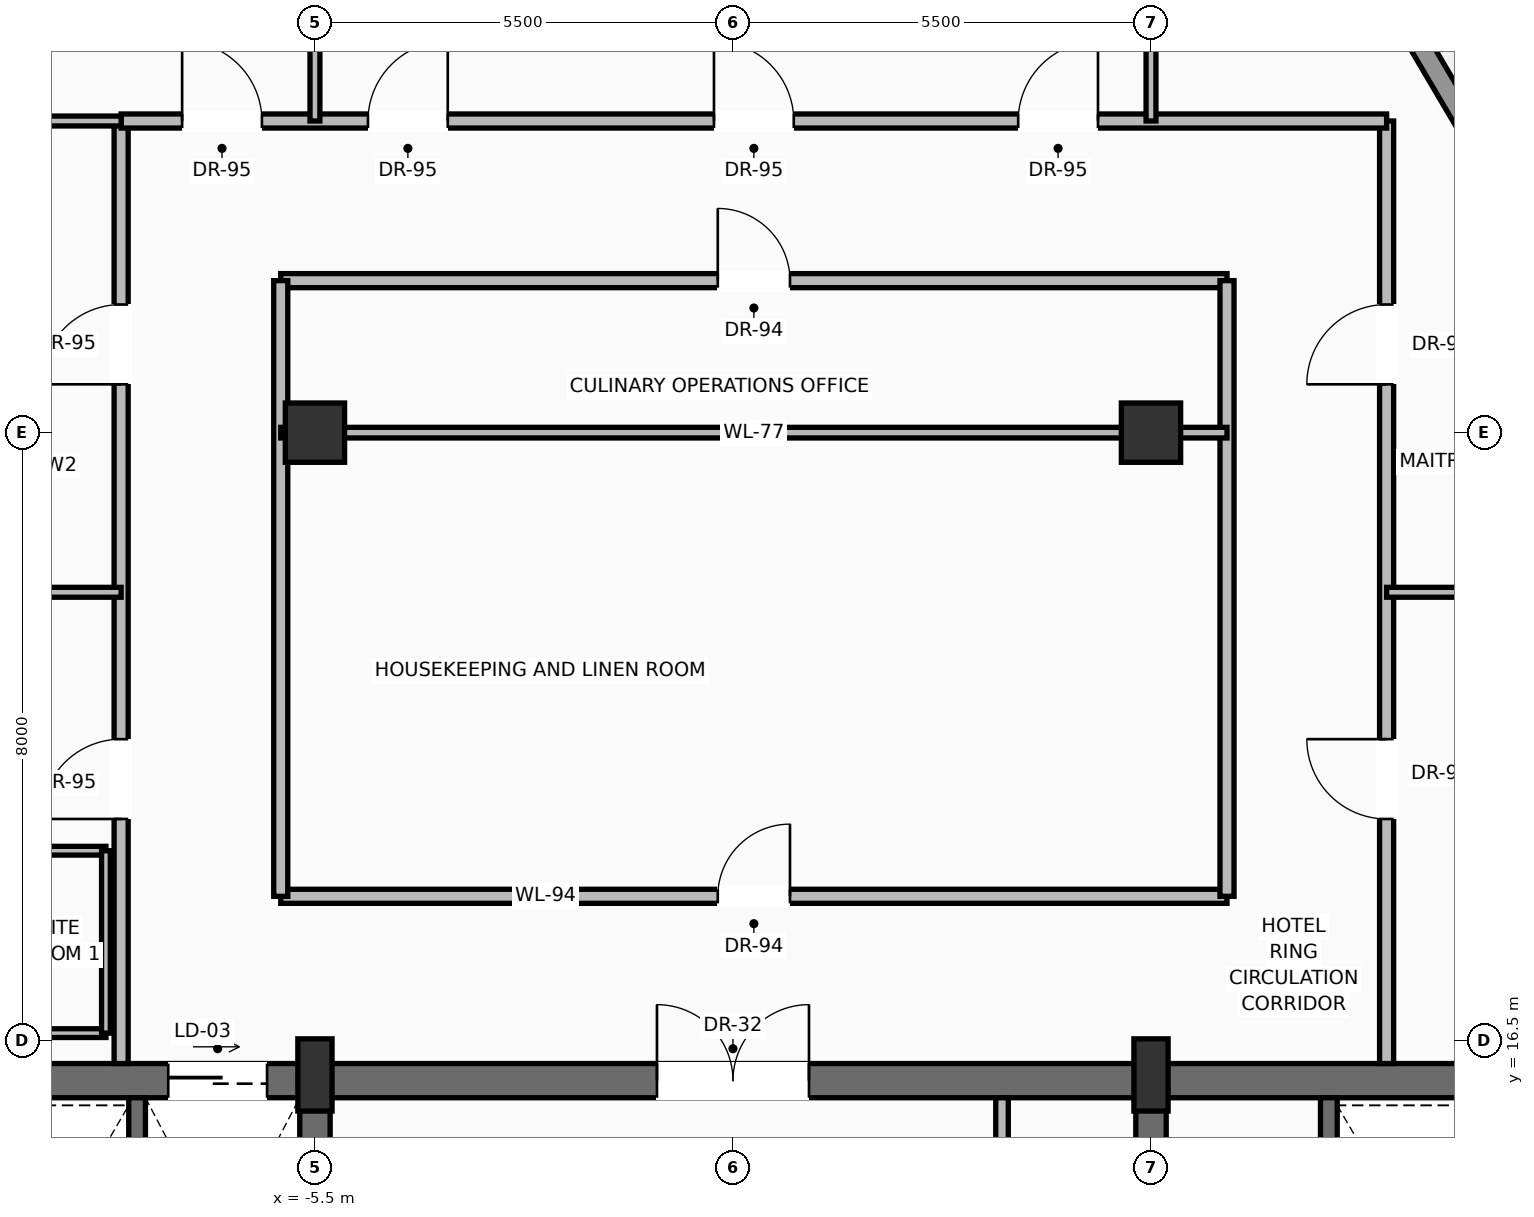
"""IFC4 building model, lengths in metres.
Left out: names, types, materials, properties, quantities, classifications, styles, units other than length and angle.
Written with IfcOpenShell. Run it as: python <this file> out.ifc"""

import sys

from ifc_helpers import new_model, si_unit, direction, frame, frame_2d, origin, origin_2d, place, context, subcontext, project, spatial, rectangle, extrude, source, transform, mapped, element, fill, save


model = new_model("IFC4")
c1 = context("Model", 3, precision=1e-05, world=origin(), true_north=direction((0.0, 1.0)))
c2 = subcontext(c1, "Body", "Model", "MODEL_VIEW")
j1 = project(units=[si_unit("LENGTHUNIT", "METRE"), si_unit("PLANEANGLEUNIT", "RADIAN")], contexts=[c1])
p1 = place(None, origin())
s1 = spatial("IfcSite", under=j1, at=p1, CompositionType="ELEMENT")
p2 = place(p1, origin())
s2 = spatial("IfcBuilding", under=s1, at=p2, CompositionType="ELEMENT")
p3 = place(p2, frame((0.0, 0.0, 279.9)))
s3 = spatial("IfcBuildingStorey", under=s2, at=p3, CompositionType="ELEMENT", Elevation=279.9)
p4 = place(p3, frame((-10.6, 15.975, 0.0), z_axis=(0.0, 0.0, 1.0), x_axis=(1.0, 0.0, 0.0)))
e1 = element("IfcWall", 1, at=p4, inside=s3, PredefinedType="SHEAR", context=c2, shape_type="SweptSolid", body=[
    extrude(rectangle(XDim=21.2, YDim=0.45, at=frame_2d((10.6, 0.0))), origin(), (0.0, 0.0, 1.0), 3.24),
])
p5 = place(p4, frame((3.17, 0.0, 0.0)))
e2 = element("IfcOpeningElement", 2, at=p5, cuts=e1, PredefinedType="OPENING", context=c2, shape_type="SweptSolid", body=[
    extrude(rectangle(XDim=1.3, YDim=2.3, at=frame_2d((0.65, 1.15))), frame((0.0, 0.235, 0.0), z_axis=(0.0, -1.0, 0.0), x_axis=(1.0, 0.0, 0.0)), (0.0, 0.0, 1.0), 0.47),
])
p6 = place(p4, frame((9.6, 0.0, 0.0)))
e3 = element("IfcOpeningElement", 3, at=p6, cuts=e1, PredefinedType="OPENING", context=c2, shape_type="SweptSolid", body=[
    extrude(rectangle(XDim=2.0, YDim=2.4, at=frame_2d((1.0, 1.2))), frame((0.0, 0.235, 0.0), z_axis=(0.0, -1.0, 0.0), x_axis=(1.0, 0.0, 0.0)), (0.0, 0.0, 1.0), 0.47),
])
p7 = place(p3, frame((-5.5, 0.625, 0.0), z_axis=(0.0, 0.0, 1.0), x_axis=(0.0, 1.0, 0.0)))
e4 = element("IfcWall", 4, at=p7, inside=s3, PredefinedType="SHEAR", context=c2, shape_type="SweptSolid", body=[
    extrude(rectangle(XDim=15.35, YDim=0.4, at=frame_2d((7.675, 0.0))), origin(), (0.0, 0.0, 1.0), 3.24),
])
p8 = place(p7, frame((8.875, 0.0, 0.0)))
e5 = element("IfcOpeningElement", 5, at=p8, cuts=e4, PredefinedType="OPENING", context=c2, shape_type="SweptSolid", body=[
    extrude(rectangle(XDim=1.1, YDim=2.2, at=frame_2d((0.55, 1.1))), frame((0.0, 0.21, 0.0), z_axis=(0.0, -1.0, 0.0), x_axis=(1.0, 0.0, 0.0)), (0.0, 0.0, 1.0), 0.42),
])
p9 = place(p3, frame((5.5, 0.625, 0.0), z_axis=(0.0, 0.0, 1.0), x_axis=(0.0, 1.0, 0.0)))
e6 = element("IfcWall", 6, at=p9, inside=s3, PredefinedType="SHEAR", context=c2, shape_type="SweptSolid", body=[
    extrude(rectangle(XDim=15.35, YDim=0.4, at=frame_2d((7.675, 0.0))), origin(), (0.0, 0.0, 1.0), 3.24),
])
p10 = place(p9, frame((8.875, 0.0, 0.0)))
e7 = element("IfcOpeningElement", 7, at=p10, cuts=e6, PredefinedType="OPENING", context=c2, shape_type="SweptSolid", body=[
    extrude(rectangle(XDim=1.1, YDim=2.2, at=frame_2d((0.55, 1.1))), frame((0.0, 0.21, 0.0), z_axis=(0.0, -1.0, 0.0), x_axis=(1.0, 0.0, 0.0)), (0.0, 0.0, 1.0), 0.42),
])
m1 = source(origin(), c2, "Body", "SweptSolid", [
    extrude(rectangle(XDim=0.45, YDim=0.95, at=origin_2d()), origin(), (0.0, 0.0, 1.0), 3.45),
])
for number, where, z_axis, x_axis in (
    (8, (-5.5, 16.05, 0.0), (0.0, 0.0, 1.0), (1.0, 0.0, 0.0)),
    (9, (5.5, 16.05, 0.0), (0.0, 0.0, 1.0), (1.0, 0.0, 0.0)),
):
    element("IfcColumn", number, at=place(p3, frame(where, z_axis=z_axis, x_axis=x_axis)), inside=s3, PredefinedType="PILASTER", context=c2, shape_type="MappedRepresentation", body=[
        mapped(m1, transform((0.0, 0.0, 0.0), scale=1.0)),
    ])
m2 = source(origin(), c2, "Body", "SweptSolid", [
    extrude(rectangle(XDim=0.78, YDim=0.78, at=origin_2d()), origin(), (0.0, 0.0, 1.0), 3.45),
])
for number, where, z_axis, x_axis in (
    (10, (-5.5, 24.5, 0.0), (0.0, 0.0, 1.0), (1.0, 0.0, 0.0)),
    (11, (5.5, 24.5, 0.0), (0.0, 0.0, 1.0), (1.0, 0.0, 0.0)),
):
    element("IfcColumn", number, at=place(p3, frame(where, z_axis=z_axis, x_axis=x_axis)), inside=s3, PredefinedType="COLUMN", context=c2, shape_type="MappedRepresentation", body=[
        mapped(m2, transform((0.0, 0.0, 0.0), scale=1.0)),
    ])
p11 = place(p3, frame((-18.34, 14.15, 0.0), z_axis=(0.0, 0.0, 1.0), x_axis=(0.499519590366, 0.866302590808, 0.0)))
e12 = element("IfcWall", 12, at=p11, inside=s3, PredefinedType="SOLIDWALL", context=c2, shape_type="SweptSolid", body=[
    extrude(rectangle(XDim=20.144, YDim=0.28, at=frame_2d((10.072, 0.0))), origin(), (0.0, 0.0, 1.0), 2.82),
])
p12 = place(p11, frame((4.834, 0.0, 0.0)))
e13 = element("IfcOpeningElement", 13, at=p12, cuts=e12, PredefinedType="OPENING", context=c2, shape_type="SweptSolid", body=[
    extrude(rectangle(XDim=1.6, YDim=2.35, at=frame_2d((0.8, 1.175))), frame((0.0, 0.15, 0.0), z_axis=(0.0, -1.0, 0.0), x_axis=(1.0, 0.0, 0.0)), (0.0, 0.0, 1.0), 0.3),
])
p13 = place(p11, frame((13.698, 0.0, 0.9)))
e14 = element("IfcOpeningElement", 14, at=p13, cuts=e12, PredefinedType="OPENING", context=c2, shape_type="SweptSolid", body=[
    extrude(rectangle(XDim=1.55, YDim=1.75, at=frame_2d((0.775, 0.875))), frame((0.0, 0.15, 0.0), z_axis=(0.0, -1.0, 0.0), x_axis=(1.0, 0.0, 0.0)), (0.0, 0.0, 1.0), 0.3),
])
p14 = place(p3, frame((7.796, 31.717, 0.0), z_axis=(0.0, 0.0, 1.0), x_axis=(0.507930566701, -0.861398014515, 0.0)))
e15 = element("IfcWall", 15, at=p14, inside=s3, PredefinedType="SOLIDWALL", context=c2, shape_type="SweptSolid", body=[
    extrude(rectangle(XDim=20.045, YDim=0.28, at=frame_2d((10.022, 0.0))), origin(), (0.0, 0.0, 1.0), 2.82),
])
p15 = place(p14, frame((4.811, 0.0, 0.0)))
e16 = element("IfcOpeningElement", 16, at=p15, cuts=e15, PredefinedType="OPENING", context=c2, shape_type="SweptSolid", body=[
    extrude(rectangle(XDim=1.6, YDim=2.35, at=frame_2d((0.8, 1.175))), frame((0.0, 0.15, 0.0), z_axis=(0.0, -1.0, 0.0), x_axis=(1.0, 0.0, 0.0)), (0.0, 0.0, 1.0), 0.3),
])
p16 = place(p14, frame((13.63, 0.0, 0.9)))
e17 = element("IfcOpeningElement", 17, at=p16, cuts=e15, PredefinedType="OPENING", context=c2, shape_type="SweptSolid", body=[
    extrude(rectangle(XDim=1.55, YDim=1.75, at=frame_2d((0.775, 0.875))), frame((0.0, 0.15, 0.0), z_axis=(0.0, -1.0, 0.0), x_axis=(1.0, 0.0, 0.0)), (0.0, 0.0, 1.0), 0.3),
])
for number, where, z_axis, x_axis in (
    (18, (-7.84, 11.87, 0.0), (0.0, 0.0, 1.0), (0.0, 1.0, 0.0)),
    (19, (7.84, 11.87, 0.0), (0.0, 0.0, 1.0), (0.0, 1.0, 0.0)),
):
    element("IfcWall", number, at=place(p3, frame(where, z_axis=z_axis, x_axis=x_axis)), inside=s3, PredefinedType="SOLIDWALL", context=c2, shape_type="SweptSolid", body=[
        extrude(rectangle(XDim=3.88, YDim=0.22, at=frame_2d((1.94, 0.0))), origin(), (0.0, 0.0, 1.0), 3.24),
    ])
p17 = place(p3, frame((3.54, 11.22, 0.0), z_axis=(0.0, 0.0, 1.0), x_axis=(0.0, 1.0, 0.0)))
e20 = element("IfcWall", 20, at=p17, inside=s3, PredefinedType="PARTITIONING", context=c2, shape_type="SweptSolid", body=[
    extrude(rectangle(XDim=4.53, YDim=0.165, at=frame_2d((2.265, 0.0))), origin(), (0.0, 0.0, 1.0), 3.232),
])
p18 = place(p17, frame((1.25, 0.0, 0.0)))
e21 = element("IfcOpeningElement", 21, at=p18, cuts=e20, PredefinedType="OPENING", context=c2, shape_type="SweptSolid", body=[
    extrude(rectangle(XDim=0.9, YDim=2.1, at=frame_2d((0.45, 1.05))), frame((0.0, 0.093, 0.0), z_axis=(0.0, -1.0, 0.0), x_axis=(1.0, 0.0, 0.0)), (0.0, 0.0, 1.0), 0.185),
])
p19 = place(p3, frame((-5.95, 18.4, 0.0), z_axis=(0.0, 0.0, 1.0), x_axis=(1.0, 0.0, 0.0)))
e22 = element("IfcWall", 22, at=p19, inside=s3, PredefinedType="PARTITIONING", context=c2, shape_type="SweptSolid", body=[
    extrude(rectangle(XDim=12.45, YDim=0.185, at=frame_2d((6.225, 0.0))), origin(), (0.0, 0.0, 1.0), 3.232),
])
p20 = place(p19, frame((5.75, 0.0, 0.0)))
e23 = element("IfcOpeningElement", 23, at=p20, cuts=e22, PredefinedType="OPENING", context=c2, shape_type="SweptSolid", body=[
    extrude(rectangle(XDim=0.95, YDim=2.2, at=frame_2d((0.475, 1.1))), frame((0.0, 0.103, 0.0), z_axis=(0.0, -1.0, 0.0), x_axis=(1.0, 0.0, 0.0)), (0.0, 0.0, 1.0), 0.205),
])
p21 = place(p3, frame((-5.95, 26.5, 0.0), z_axis=(0.0, 0.0, 1.0), x_axis=(1.0, 0.0, 0.0)))
e24 = element("IfcWall", 24, at=p21, inside=s3, PredefinedType="PARTITIONING", context=c2, shape_type="SweptSolid", body=[
    extrude(rectangle(XDim=12.45, YDim=0.185, at=frame_2d((6.225, 0.0))), origin(), (0.0, 0.0, 1.0), 3.232),
])
p22 = place(p21, frame((5.75, 0.0, 0.0)))
e25 = element("IfcOpeningElement", 25, at=p22, cuts=e24, PredefinedType="OPENING", context=c2, shape_type="SweptSolid", body=[
    extrude(rectangle(XDim=0.95, YDim=2.2, at=frame_2d((0.475, 1.1))), frame((0.0, 0.103, 0.0), z_axis=(0.0, -1.0, 0.0), x_axis=(1.0, 0.0, 0.0)), (0.0, 0.0, 1.0), 0.205),
])
for number, where, z_axis, x_axis in (
    (26, (-5.95, 18.4, 0.0), (0.0, 0.0, 1.0), (0.0, 1.0, 0.0)),
    (27, (6.5, 18.4, 0.0), (0.0, 0.0, 1.0), (0.0, 1.0, 0.0)),
):
    element("IfcWall", number, at=place(p3, frame(where, z_axis=z_axis, x_axis=x_axis)), inside=s3, PredefinedType="PARTITIONING", context=c2, shape_type="SweptSolid", body=[
        extrude(rectangle(XDim=8.1, YDim=0.185, at=frame_2d((4.05, 0.0))), origin(), (0.0, 0.0, 1.0), 3.232),
    ])
p23 = place(p3, frame((-8.05, 16.2, 0.0), z_axis=(0.0, 0.0, 1.0), x_axis=(0.0, 1.0, 0.0)))
e28 = element("IfcWall", 28, at=p23, inside=s3, PredefinedType="PARTITIONING", context=c2, shape_type="SweptSolid", body=[
    extrude(rectangle(XDim=12.4, YDim=0.185, at=frame_2d((6.2, 0.0))), origin(), (0.0, 0.0, 1.0), 3.232),
])
p24 = place(p23, frame((3.218, 0.0, 0.0)))
e29 = element("IfcOpeningElement", 29, at=p24, cuts=e28, PredefinedType="OPENING", context=c2, shape_type="SweptSolid", body=[
    extrude(rectangle(XDim=1.05, YDim=2.25, at=frame_2d((0.525, 1.125))), frame((0.0, 0.103, 0.0), z_axis=(0.0, -1.0, 0.0), x_axis=(1.0, 0.0, 0.0)), (0.0, 0.0, 1.0), 0.205),
])
p25 = place(p23, frame((8.936, 0.0, 0.0)))
e30 = element("IfcOpeningElement", 30, at=p25, cuts=e28, PredefinedType="OPENING", context=c2, shape_type="SweptSolid", body=[
    extrude(rectangle(XDim=1.05, YDim=2.25, at=frame_2d((0.525, 1.125))), frame((0.0, 0.103, 0.0), z_axis=(0.0, -1.0, 0.0), x_axis=(1.0, 0.0, 0.0)), (0.0, 0.0, 1.0), 0.205),
])
p26 = place(p3, frame((8.6, 16.2, 0.0), z_axis=(0.0, 0.0, 1.0), x_axis=(0.0, 1.0, 0.0)))
e31 = element("IfcWall", 31, at=p26, inside=s3, PredefinedType="PARTITIONING", context=c2, shape_type="SweptSolid", body=[
    extrude(rectangle(XDim=12.4, YDim=0.185, at=frame_2d((6.2, 0.0))), origin(), (0.0, 0.0, 1.0), 3.232),
])
p27 = place(p26, frame((3.218, 0.0, 0.0)))
e32 = element("IfcOpeningElement", 32, at=p27, cuts=e31, PredefinedType="OPENING", context=c2, shape_type="SweptSolid", body=[
    extrude(rectangle(XDim=1.05, YDim=2.25, at=frame_2d((0.525, 1.125))), frame((0.0, 0.103, 0.0), z_axis=(0.0, -1.0, 0.0), x_axis=(1.0, 0.0, 0.0)), (0.0, 0.0, 1.0), 0.205),
])
p28 = place(p26, frame((8.936, 0.0, 0.0)))
e33 = element("IfcOpeningElement", 33, at=p28, cuts=e31, PredefinedType="OPENING", context=c2, shape_type="SweptSolid", body=[
    extrude(rectangle(XDim=1.05, YDim=2.25, at=frame_2d((0.525, 1.125))), frame((0.0, 0.103, 0.0), z_axis=(0.0, -1.0, 0.0), x_axis=(1.0, 0.0, 0.0)), (0.0, 0.0, 1.0), 0.205),
])
p29 = place(p3, frame((-8.05, 28.6, 0.0), z_axis=(0.0, 0.0, 1.0), x_axis=(1.0, 0.0, 0.0)))
e34 = element("IfcWall", 34, at=p29, inside=s3, PredefinedType="PARTITIONING", context=c2, shape_type="SweptSolid", body=[
    extrude(rectangle(XDim=16.65, YDim=0.185, at=frame_2d((8.325, 0.0))), origin(), (0.0, 0.0, 1.0), 3.232),
])
p30 = place(p29, frame((3.248, 0.0, 0.0)))
e35 = element("IfcOpeningElement", 35, at=p30, cuts=e34, PredefinedType="OPENING", context=c2, shape_type="SweptSolid", body=[
    extrude(rectangle(XDim=1.05, YDim=2.25, at=frame_2d((0.525, 1.125))), frame((0.0, 0.103, 0.0), z_axis=(0.0, -1.0, 0.0), x_axis=(1.0, 0.0, 0.0)), (0.0, 0.0, 1.0), 0.205),
])
p31 = place(p29, frame((7.8, 0.0, 0.0)))
e36 = element("IfcOpeningElement", 36, at=p31, cuts=e34, PredefinedType="OPENING", context=c2, shape_type="SweptSolid", body=[
    extrude(rectangle(XDim=1.05, YDim=2.25, at=frame_2d((0.525, 1.125))), frame((0.0, 0.103, 0.0), z_axis=(0.0, -1.0, 0.0), x_axis=(1.0, 0.0, 0.0)), (0.0, 0.0, 1.0), 0.205),
])
p32 = place(p29, frame((11.802, 0.0, 0.0)))
e37 = element("IfcOpeningElement", 37, at=p32, cuts=e34, PredefinedType="OPENING", context=c2, shape_type="SweptSolid", body=[
    extrude(rectangle(XDim=1.05, YDim=2.25, at=frame_2d((0.525, 1.125))), frame((0.0, 0.103, 0.0), z_axis=(0.0, -1.0, 0.0), x_axis=(1.0, 0.0, 0.0)), (0.0, 0.0, 1.0), 0.205),
])
p33 = place(p29, frame((0.802, 0.0, 0.0)))
e38 = element("IfcOpeningElement", 38, at=p33, cuts=e34, PredefinedType="OPENING", context=c2, shape_type="SweptSolid", body=[
    extrude(rectangle(XDim=1.05, YDim=2.25, at=frame_2d((0.525, 1.125))), frame((0.0, 0.103, 0.0), z_axis=(0.0, -1.0, 0.0), x_axis=(1.0, 0.0, 0.0)), (0.0, 0.0, 1.0), 0.205),
])
p34 = place(p3, frame((-5.95, 24.5, 0.0), z_axis=(0.0, 0.0, 1.0), x_axis=(1.0, 0.0, 0.0)))
e39 = element("IfcWall", 39, at=p34, inside=s3, PredefinedType="PARTITIONING", context=c2, shape_type="SweptSolid", body=[
    extrude(rectangle(XDim=12.45, YDim=0.14, at=frame_2d((6.225, 0.0))), origin(), (0.0, 0.0, 1.0), 2.683),
])
p35 = place(p3, frame((-10.158, 28.6, 0.0), z_axis=(0.0, 0.0, 1.0), x_axis=(1.0, 0.0, 0.0)))
e40 = element("IfcWall", 40, at=p35, inside=s3, PredefinedType="PARTITIONING", context=c2, shape_type="SweptSolid", body=[
    extrude(rectangle(XDim=2.108, YDim=0.13, at=frame_2d((1.054, 0.0))), origin(), (0.0, 0.0, 1.0), 3.232),
])
p36 = place(p3, frame((-5.5, 28.6, 0.0), z_axis=(0.0, 0.0, 1.0), x_axis=(0.0, 1.0, 0.0)))
e41 = element("IfcWall", 41, at=p36, inside=s3, PredefinedType="PARTITIONING", context=c2, shape_type="SweptSolid", body=[
    extrude(rectangle(XDim=8.078, YDim=0.13, at=frame_2d((4.039, 0.0))), origin(), (0.0, 0.0, 1.0), 2.683),
])
p37 = place(p3, frame((5.5, 28.6, 0.0), z_axis=(0.0, 0.0, 1.0), x_axis=(0.0, 1.0, 0.0)))
e42 = element("IfcWall", 42, at=p37, inside=s3, PredefinedType="PARTITIONING", context=c2, shape_type="SweptSolid", body=[
    extrude(rectangle(XDim=7.267, YDim=0.13, at=frame_2d((3.634, 0.0))), origin(), (0.0, 0.0, 1.0), 2.683),
])
for number, where, z_axis, x_axis in (
    (43, (-10.9, 16.6, 0.0), (0.0, 0.0, 1.0), (1.0, 0.0, 0.0)),
    (44, (-10.9, 19.0, 0.0), (0.0, 0.0, 1.0), (1.0, 0.0, 0.0)),
):
    element("IfcWall", number, at=place(p3, frame(where, z_axis=z_axis, x_axis=x_axis)), inside=s3, PredefinedType="PARTITIONING", context=c2, shape_type="SweptSolid", body=[
        extrude(rectangle(XDim=2.65, YDim=0.115, at=frame_2d((1.325, 0.0))), origin(), (0.0, 0.0, 1.0), 3.232),
    ])
p38 = place(p3, frame((-8.25, 16.6, 0.0), z_axis=(0.0, 0.0, 1.0), x_axis=(0.0, 1.0, 0.0)))
e45 = element("IfcWall", 45, at=p38, inside=s3, PredefinedType="PARTITIONING", context=c2, shape_type="SweptSolid", body=[
    extrude(rectangle(XDim=2.4, YDim=0.115, at=frame_2d((1.2, 0.0))), origin(), (0.0, 0.0, 1.0), 3.232),
])
p39 = place(p3, frame((-13.733, 22.4, 0.0), z_axis=(0.0, 0.0, 1.0), x_axis=(1.0, 0.0, 0.0)))
e46 = element("IfcWall", 46, at=p39, inside=s3, PredefinedType="PARTITIONING", context=c2, shape_type="SweptSolid", body=[
    extrude(rectangle(XDim=5.683, YDim=0.13, at=frame_2d((2.842, 0.0))), origin(), (0.0, 0.0, 1.0), 3.232),
])
p40 = place(p3, frame((8.6, 22.4, 0.0), z_axis=(0.0, 0.0, 1.0), x_axis=(1.0, 0.0, 0.0)))
e47 = element("IfcWall", 47, at=p40, inside=s3, PredefinedType="PARTITIONING", context=c2, shape_type="SweptSolid", body=[
    extrude(rectangle(XDim=4.841, YDim=0.13, at=frame_2d((2.42, 0.0))), origin(), (0.0, 0.0, 1.0), 3.232),
])
m3 = source(origin(), c2, "Body", "SweptSolid", [
    extrude(rectangle(XDim=1.3, YDim=2.3, at=frame_2d((0.65, 1.15))), frame((0.0, 0.025, 0.0), z_axis=(0.0, -1.0, 0.0), x_axis=(1.0, 0.0, 0.0)), (0.0, 0.0, 1.0), 0.05),
])
p41 = place(p5, origin())
e48 = element("IfcDoor", 48, at=p41, inside=s3, OperationType="SLIDING_TO_RIGHT", PredefinedType="DOOR", context=c2, shape_type="MappedRepresentation", body=[
    mapped(m3, transform((0.0, 0.0, 0.0), scale=1.0)),
])
fill(e2, e48)
m4 = source(origin(), c2, "Body", "SweptSolid", [
    extrude(rectangle(XDim=2.0, YDim=2.4, at=frame_2d((1.0, 1.2))), frame((0.0, 0.025, 0.0), z_axis=(0.0, -1.0, 0.0), x_axis=(1.0, 0.0, 0.0)), (0.0, 0.0, 1.0), 0.05),
])
p42 = place(p6, origin())
e49 = element("IfcDoor", 49, at=p42, inside=s3, OperationType="DOUBLE_DOOR_SINGLE_SWING", PredefinedType="DOOR", context=c2, shape_type="MappedRepresentation", body=[
    mapped(m4, transform((0.0, 0.0, 0.0), scale=1.0)),
])
fill(e3, e49)
m5 = source(origin(), c2, "Body", "SweptSolid", [
    extrude(rectangle(XDim=0.95, YDim=2.2, at=frame_2d((0.475, 1.1))), frame((0.0, 0.025, 0.0), z_axis=(0.0, -1.0, 0.0), x_axis=(1.0, 0.0, 0.0)), (0.0, 0.0, 1.0), 0.05),
])
p43 = place(p20, origin())
e50 = element("IfcDoor", 50, at=p43, inside=s3, OperationType="SINGLE_SWING_RIGHT", PredefinedType="DOOR", context=c2, shape_type="MappedRepresentation", body=[
    mapped(m5, transform((0.0, 0.0, 0.0), scale=1.0)),
])
fill(e23, e50)
p44 = place(p22, origin())
e51 = element("IfcDoor", 51, at=p44, inside=s3, OperationType="SINGLE_SWING_LEFT", PredefinedType="DOOR", context=c2, shape_type="MappedRepresentation", body=[
    mapped(m5, transform((0.0, 0.0, 0.0), scale=1.0)),
])
fill(e25, e51)
m6 = source(origin(), c2, "Body", "SweptSolid", [
    extrude(rectangle(XDim=1.05, YDim=2.25, at=frame_2d((0.525, 1.125))), frame((0.0, 0.025, 0.0), z_axis=(0.0, -1.0, 0.0), x_axis=(1.0, 0.0, 0.0)), (0.0, 0.0, 1.0), 0.05),
])
p45 = place(p24, origin())
e52 = element("IfcDoor", 52, at=p45, inside=s3, OperationType="SINGLE_SWING_LEFT", PredefinedType="DOOR", context=c2, shape_type="MappedRepresentation", body=[
    mapped(m6, transform((0.0, 0.0, 0.0), scale=1.0)),
])
fill(e29, e52)
p46 = place(p25, origin())
e53 = element("IfcDoor", 53, at=p46, inside=s3, OperationType="SINGLE_SWING_LEFT", PredefinedType="DOOR", context=c2, shape_type="MappedRepresentation", body=[
    mapped(m6, transform((0.0, 0.0, 0.0), scale=1.0)),
])
fill(e30, e53)
p47 = place(p27, origin())
e54 = element("IfcDoor", 54, at=p47, inside=s3, OperationType="SINGLE_SWING_RIGHT", PredefinedType="DOOR", context=c2, shape_type="MappedRepresentation", body=[
    mapped(m6, transform((0.0, 0.0, 0.0), scale=1.0)),
])
fill(e32, e54)
p48 = place(p28, origin())
e55 = element("IfcDoor", 55, at=p48, inside=s3, OperationType="SINGLE_SWING_LEFT", PredefinedType="DOOR", context=c2, shape_type="MappedRepresentation", body=[
    mapped(m6, transform((0.0, 0.0, 0.0), scale=1.0)),
])
fill(e33, e55)
p49 = place(p30, origin())
e56 = element("IfcDoor", 56, at=p49, inside=s3, OperationType="SINGLE_SWING_RIGHT", PredefinedType="DOOR", context=c2, shape_type="MappedRepresentation", body=[
    mapped(m6, transform((0.0, 0.0, 0.0), scale=1.0)),
])
fill(e35, e56)
p50 = place(p31, origin())
e57 = element("IfcDoor", 57, at=p50, inside=s3, OperationType="SINGLE_SWING_LEFT", PredefinedType="DOOR", context=c2, shape_type="MappedRepresentation", body=[
    mapped(m6, transform((0.0, 0.0, 0.0), scale=1.0)),
])
fill(e36, e57)
p51 = place(p32, origin())
e58 = element("IfcDoor", 58, at=p51, inside=s3, OperationType="SINGLE_SWING_RIGHT", PredefinedType="DOOR", context=c2, shape_type="MappedRepresentation", body=[
    mapped(m6, transform((0.0, 0.0, 0.0), scale=1.0)),
])
fill(e37, e58)
p52 = place(p33, origin())
e59 = element("IfcDoor", 59, at=p52, inside=s3, OperationType="SINGLE_SWING_LEFT", PredefinedType="DOOR", context=c2, shape_type="MappedRepresentation", body=[
    mapped(m6, transform((0.0, 0.0, 0.0), scale=1.0)),
])
fill(e38, e59)
save(model, sys.argv[1])
